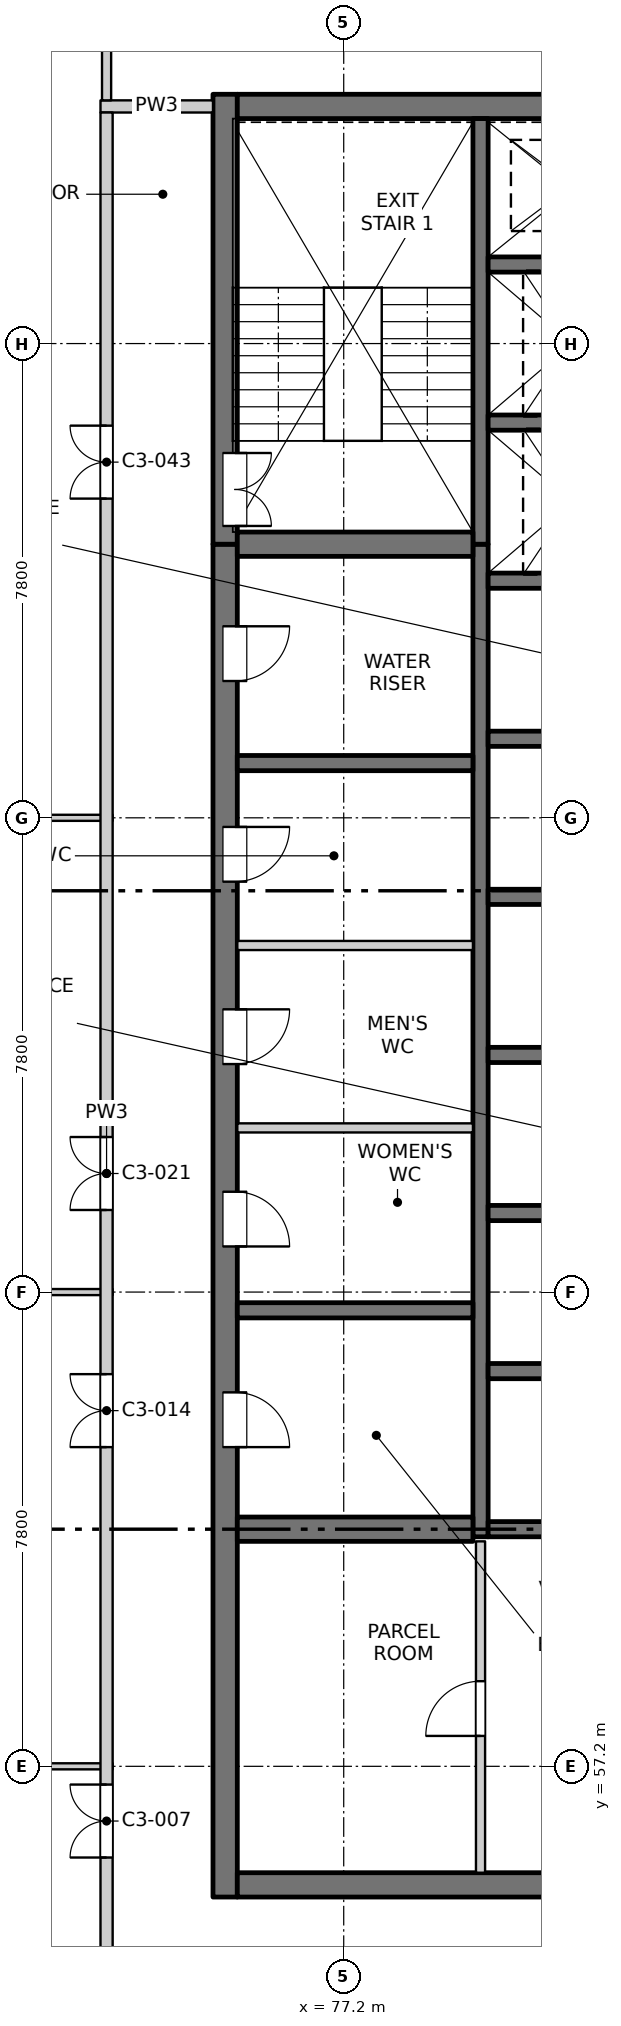
"""IFC4 building model, lengths in metres.
Left out: names, types, materials, properties, quantities, classifications, styles, units other than length and angle.
Written with IfcOpenShell. Run it as: python <this file> out.ifc"""

import sys

from ifc_helpers import new_model, si_unit, direction, frame, frame_2d, origin, place, context, subcontext, project, spatial, rectangle, extrude, element, fill, save


model = new_model("IFC4")
c1 = context("Model", 3, precision=1e-05, world=origin(), true_north=direction((0.0, 1.0)))
c2 = subcontext(c1, "Body", "Model", "MODEL_VIEW")
j1 = project(units=[si_unit("LENGTHUNIT", "METRE"), si_unit("PLANEANGLEUNIT", "RADIAN")], contexts=[c1])
p1 = place(None, origin())
s1 = spatial("IfcSite", under=j1, at=p1, CompositionType="ELEMENT")
p2 = place(p1, origin())
s2 = spatial("IfcBuilding", under=s1, at=p2, CompositionType="ELEMENT")
p3 = place(p2, frame((0.0, 0.0, 200.7)))
s3 = spatial("IfcBuildingStorey", under=s2, at=p3, CompositionType="ELEMENT", Elevation=200.7)
p4 = place(p3, frame((75.25, 55.05, -0.25), z_axis=(0.0, 0.0, 1.0), x_axis=(0.0, 1.0, 0.0)))
e1 = element("IfcWall", 1, at=p4, inside=s3, PredefinedType="SOLIDWALL", context=c2, shape_type="SweptSolid", body=[
    extrude(rectangle(XDim=22.25, YDim=0.4, at=frame_2d((11.125, 0.0))), origin(), (0.0, 0.0, 1.0), 3.4),
])
p5 = place(p4, frame((7.4, 0.0, 0.25)))
e2 = element("IfcOpeningElement", 2, at=p5, cuts=e1, PredefinedType="OPENING", context=c2, shape_type="SweptSolid", body=[
    extrude(rectangle(XDim=0.9, YDim=2.1, at=frame_2d((0.45, 1.05))), frame((0.0, 0.21, 0.0), z_axis=(0.0, -1.0, 0.0), x_axis=(1.0, 0.0, 0.0)), (0.0, 0.0, 1.0), 0.42),
])
p6 = place(p4, frame((10.7, 0.0, 0.25)))
e3 = element("IfcOpeningElement", 3, at=p6, cuts=e1, PredefinedType="OPENING", context=c2, shape_type="SweptSolid", body=[
    extrude(rectangle(XDim=0.9, YDim=2.1, at=frame_2d((0.45, 1.05))), frame((0.0, 0.21, 0.0), z_axis=(0.0, -1.0, 0.0), x_axis=(1.0, 0.0, 0.0)), (0.0, 0.0, 1.0), 0.42),
])
p7 = place(p4, frame((13.7, 0.0, 0.25)))
e4 = element("IfcOpeningElement", 4, at=p7, cuts=e1, PredefinedType="OPENING", context=c2, shape_type="SweptSolid", body=[
    extrude(rectangle(XDim=0.9, YDim=2.1, at=frame_2d((0.45, 1.05))), frame((0.0, 0.21, 0.0), z_axis=(0.0, -1.0, 0.0), x_axis=(1.0, 0.0, 0.0)), (0.0, 0.0, 1.0), 0.42),
])
p8 = place(p4, frame((16.7, 0.0, 0.25)))
e5 = element("IfcOpeningElement", 5, at=p8, cuts=e1, PredefinedType="OPENING", context=c2, shape_type="SweptSolid", body=[
    extrude(rectangle(XDim=0.9, YDim=2.1, at=frame_2d((0.45, 1.05))), frame((0.0, 0.21, 0.0), z_axis=(0.0, -1.0, 0.0), x_axis=(1.0, 0.0, 0.0)), (0.0, 0.0, 1.0), 0.42),
])
p9 = place(p4, frame((20.0, 0.0, 0.25)))
e6 = element("IfcOpeningElement", 6, at=p9, cuts=e1, PredefinedType="OPENING", context=c2, shape_type="SweptSolid", body=[
    extrude(rectangle(XDim=0.9, YDim=2.1, at=frame_2d((0.45, 1.05))), frame((0.0, 0.21, 0.0), z_axis=(0.0, -1.0, 0.0), x_axis=(1.0, 0.0, 0.0)), (0.0, 0.0, 1.0), 0.42),
])
p10 = place(p3, frame((75.25, 77.3, -0.25), z_axis=(0.0, 0.0, 1.0), x_axis=(0.0, 1.0, 0.0)))
e7 = element("IfcWall", 7, at=p10, inside=s3, PredefinedType="SOLIDWALL", context=c2, shape_type="SweptSolid", body=[
    extrude(rectangle(XDim=7.4, YDim=0.4, at=frame_2d((3.7, 0.0))), origin(), (0.0, 0.0, 1.0), 3.4),
])
p11 = place(p10, frame((0.3, 0.0, 0.25)))
e8 = element("IfcOpeningElement", 8, at=p11, cuts=e7, PredefinedType="OPENING", context=c2, shape_type="SweptSolid", body=[
    extrude(rectangle(XDim=1.2, YDim=2.1, at=frame_2d((0.6, 1.05))), frame((0.0, 0.21, 0.0), z_axis=(0.0, -1.0, 0.0), x_axis=(1.0, 0.0, 0.0)), (0.0, 0.0, 1.0), 0.42),
])
p12 = place(p3, frame((75.45, 55.25, -0.25), z_axis=(0.0, 0.0, 1.0), x_axis=(1.0, 0.0, 0.0)))
e9 = element("IfcWall", 9, at=p12, inside=s3, PredefinedType="SOLIDWALL", context=c2, shape_type="SweptSolid", body=[
    extrude(rectangle(XDim=19.1, YDim=0.4, at=frame_2d((9.55, 0.0))), origin(), (0.0, 0.0, 1.0), 3.4),
])
p13 = place(p12, frame((8.8, 0.0, 0.25)))
e10 = element("IfcOpeningElement", 10, at=p13, cuts=e9, PredefinedType="OPENING", context=c2, shape_type="SweptSolid", body=[
    extrude(rectangle(XDim=1.5, YDim=2.1, at=frame_2d((0.75, 1.05))), frame((0.0, 0.21, 0.0), z_axis=(0.0, -1.0, 0.0), x_axis=(1.0, 0.0, 0.0)), (0.0, 0.0, 1.0), 0.42),
])
p14 = place(p3, frame((75.45, 84.5, -0.25), z_axis=(0.0, 0.0, 1.0), x_axis=(1.0, 0.0, 0.0)))
e11 = element("IfcWall", 11, at=p14, inside=s3, PredefinedType="SOLIDWALL", context=c2, shape_type="SweptSolid", body=[
    extrude(rectangle(XDim=19.1, YDim=0.4, at=frame_2d((9.55, 0.0))), origin(), (0.0, 0.0, 1.0), 3.4),
])
p15 = place(p3, frame((79.45, 60.975, -0.25), z_axis=(0.0, 0.0, 1.0), x_axis=(0.0, 1.0, 0.0)))
e12 = element("IfcWall", 12, at=p15, inside=s3, PredefinedType="SOLIDWALL", context=c2, shape_type="SweptSolid", body=[
    extrude(rectangle(XDim=16.325, YDim=0.25, at=frame_2d((8.163, 0.0))), origin(), (0.0, 0.0, 1.0), 3.4),
])
p16 = place(p3, frame((79.45, 77.3, -0.25), z_axis=(0.0, 0.0, 1.0), x_axis=(0.0, 1.0, 0.0)))
e13 = element("IfcWall", 13, at=p16, inside=s3, PredefinedType="SOLIDWALL", context=c2, shape_type="SweptSolid", body=[
    extrude(rectangle(XDim=7.0, YDim=0.25, at=frame_2d((3.5, 0.0))), origin(), (0.0, 0.0, 1.0), 3.4),
])
for number, where, z_axis, x_axis in (
    (14, (79.575, 61.1, -0.25), (0.0, 0.0, 1.0), (1.0, 0.0, 0.0)),
    (15, (79.575, 63.7, -0.25), (0.0, 0.0, 1.0), (1.0, 0.0, 0.0)),
    (16, (79.575, 66.3, -0.25), (0.0, 0.0, 1.0), (1.0, 0.0, 0.0)),
    (17, (79.575, 68.9, -0.25), (0.0, 0.0, 1.0), (1.0, 0.0, 0.0)),
    (18, (79.575, 71.5, -0.25), (0.0, 0.0, 1.0), (1.0, 0.0, 0.0)),
    (19, (79.575, 74.1, -0.25), (0.0, 0.0, 1.0), (1.0, 0.0, 0.0)),
    (20, (79.575, 76.7, -0.25), (0.0, 0.0, 1.0), (1.0, 0.0, 0.0)),
    (21, (79.575, 79.3, -0.25), (0.0, 0.0, 1.0), (1.0, 0.0, 0.0)),
    (22, (79.575, 81.9, -0.25), (0.0, 0.0, 1.0), (1.0, 0.0, 0.0)),
):
    element("IfcWall", number, at=place(p3, frame(where, z_axis=z_axis, x_axis=x_axis)), inside=s3, PredefinedType="SOLIDWALL", context=c2, shape_type="SweptSolid", body=[
        extrude(rectangle(XDim=3.0, YDim=0.25, at=frame_2d((1.5, 0.0))), origin(), (0.0, 0.0, 1.0), 3.4),
    ])
p17 = place(p3, frame((75.45, 61.1, -0.25), z_axis=(0.0, 0.0, 1.0), x_axis=(1.0, 0.0, 0.0)))
e23 = element("IfcWall", 23, at=p17, inside=s3, PredefinedType="SOLIDWALL", context=c2, shape_type="SweptSolid", body=[
    extrude(rectangle(XDim=3.875, YDim=0.4, at=frame_2d((1.938, 0.0))), origin(), (0.0, 0.0, 1.0), 3.4),
])
for number, where, z_axis, x_axis in (
    (24, (75.45, 64.7, -0.25), (0.0, 0.0, 1.0), (1.0, 0.0, 0.0)),
    (25, (75.45, 73.7, -0.25), (0.0, 0.0, 1.0), (1.0, 0.0, 0.0)),
):
    element("IfcWall", number, at=place(p3, frame(where, z_axis=z_axis, x_axis=x_axis)), inside=s3, PredefinedType="SOLIDWALL", context=c2, shape_type="SweptSolid", body=[
        extrude(rectangle(XDim=3.875, YDim=0.25, at=frame_2d((1.938, 0.0))), origin(), (0.0, 0.0, 1.0), 3.4),
    ])
p18 = place(p3, frame((75.45, 77.3, -0.25), z_axis=(0.0, 0.0, 1.0), x_axis=(1.0, 0.0, 0.0)))
e26 = element("IfcWall", 26, at=p18, inside=s3, PredefinedType="SOLIDWALL", context=c2, shape_type="SweptSolid", body=[
    extrude(rectangle(XDim=3.875, YDim=0.4, at=frame_2d((1.938, 0.0))), origin(), (0.0, 0.0, 1.0), 3.4),
])
for number, where, z_axis, x_axis in (
    (27, (61.735, 57.2, 0.0), (0.0, 0.0, 1.0), (1.0, 0.0, 0.0)),
    (28, (61.735, 65.0, 0.0), (0.0, 0.0, 1.0), (1.0, 0.0, 0.0)),
):
    element("IfcWall", number, at=place(p3, frame(where, z_axis=z_axis, x_axis=x_axis)), inside=s3, PredefinedType="PARTITIONING", context=c2, shape_type="SweptSolid", body=[
        extrude(rectangle(XDim=11.665, YDim=0.1, at=frame_2d((5.833, 0.0))), origin(), (0.0, 0.0, 1.0), 3.15),
    ])
for number, where, z_axis, x_axis in (
    (29, (75.45, 67.7, 0.0), (0.0, 0.0, 1.0), (1.0, 0.0, 0.0)),
    (30, (75.45, 70.7, 0.0), (0.0, 0.0, 1.0), (1.0, 0.0, 0.0)),
):
    element("IfcWall", number, at=place(p3, frame(where, z_axis=z_axis, x_axis=x_axis)), inside=s3, PredefinedType="PARTITIONING", context=c2, shape_type="SweptSolid", body=[
        extrude(rectangle(XDim=3.875, YDim=0.15, at=frame_2d((1.938, 0.0))), origin(), (0.0, 0.0, 1.0), 3.15),
    ])
p19 = place(p3, frame((61.735, 72.8, 0.0), z_axis=(0.0, 0.0, 1.0), x_axis=(1.0, 0.0, 0.0)))
e31 = element("IfcWall", 31, at=p19, inside=s3, PredefinedType="PARTITIONING", context=c2, shape_type="SweptSolid", body=[
    extrude(rectangle(XDim=11.665, YDim=0.1, at=frame_2d((5.833, 0.0))), origin(), (0.0, 0.0, 1.0), 3.15),
])
p20 = place(p3, frame((73.2, 84.5, 0.0), z_axis=(0.0, 0.0, 1.0), x_axis=(1.0, 0.0, 0.0)))
e32 = element("IfcWall", 32, at=p20, inside=s3, PredefinedType="PARTITIONING", context=c2, shape_type="SweptSolid", body=[
    extrude(rectangle(XDim=1.85, YDim=0.2, at=frame_2d((0.925, 0.0))), origin(), (0.0, 0.0, 1.0), 3.15),
])
p21 = place(p3, frame((73.3, 49.5, 0.0), z_axis=(0.0, 0.0, 1.0), x_axis=(0.0, 1.0, 0.0)))
e33 = element("IfcWall", 33, at=p21, inside=s3, PredefinedType="PARTITIONING", context=c2, shape_type="SweptSolid", body=[
    extrude(rectangle(XDim=34.9, YDim=0.2, at=frame_2d((17.45, 0.0))), origin(), (0.0, 0.0, 1.0), 3.15),
])
p22 = place(p21, frame((6.2, 0.0, 0.0)))
e34 = element("IfcOpeningElement", 34, at=p22, cuts=e33, PredefinedType="OPENING", context=c2, shape_type="SweptSolid", body=[
    extrude(rectangle(XDim=1.2, YDim=2.1, at=frame_2d((0.6, 1.05))), frame((0.0, 0.11, 0.0), z_axis=(0.0, -1.0, 0.0), x_axis=(1.0, 0.0, 0.0)), (0.0, 0.0, 1.0), 0.22),
])
p23 = place(p21, frame((12.95, 0.0, 0.0)))
e35 = element("IfcOpeningElement", 35, at=p23, cuts=e33, PredefinedType="OPENING", context=c2, shape_type="SweptSolid", body=[
    extrude(rectangle(XDim=1.2, YDim=2.1, at=frame_2d((0.6, 1.05))), frame((0.0, 0.11, 0.0), z_axis=(0.0, -1.0, 0.0), x_axis=(1.0, 0.0, 0.0)), (0.0, 0.0, 1.0), 0.22),
])
p24 = place(p21, frame((16.85, 0.0, 0.0)))
e36 = element("IfcOpeningElement", 36, at=p24, cuts=e33, PredefinedType="OPENING", context=c2, shape_type="SweptSolid", body=[
    extrude(rectangle(XDim=1.2, YDim=2.1, at=frame_2d((0.6, 1.05))), frame((0.0, 0.11, 0.0), z_axis=(0.0, -1.0, 0.0), x_axis=(1.0, 0.0, 0.0)), (0.0, 0.0, 1.0), 0.22),
])
p25 = place(p21, frame((28.55, 0.0, 0.0)))
e37 = element("IfcOpeningElement", 37, at=p25, cuts=e33, PredefinedType="OPENING", context=c2, shape_type="SweptSolid", body=[
    extrude(rectangle(XDim=1.2, YDim=2.1, at=frame_2d((0.6, 1.05))), frame((0.0, 0.11, 0.0), z_axis=(0.0, -1.0, 0.0), x_axis=(1.0, 0.0, 0.0)), (0.0, 0.0, 1.0), 0.22),
])
p26 = place(p3, frame((73.3, 84.6, 0.0), z_axis=(0.0, 0.0, 1.0), x_axis=(0.0, 1.0, 0.0)))
e38 = element("IfcWall", 38, at=p26, inside=s3, PredefinedType="PARTITIONING", context=c2, shape_type="SweptSolid", body=[
    extrude(rectangle(XDim=3.665, YDim=0.15, at=frame_2d((1.833, 0.0))), origin(), (0.0, 0.0, 1.0), 3.15),
])
p27 = place(p26, frame((1.25, 0.0, 0.0)))
e39 = element("IfcOpeningElement", 39, at=p27, cuts=e38, PredefinedType="OPENING", context=c2, shape_type="SweptSolid", body=[
    extrude(rectangle(XDim=1.2, YDim=2.1, at=frame_2d((0.6, 1.05))), frame((0.0, 0.085, 0.0), z_axis=(0.0, -1.0, 0.0), x_axis=(1.0, 0.0, 0.0)), (0.0, 0.0, 1.0), 0.17),
])
p28 = place(p3, frame((79.45, 55.45, 0.0), z_axis=(0.0, 0.0, 1.0), x_axis=(0.0, 1.0, 0.0)))
e40 = element("IfcWall", 40, at=p28, inside=s3, PredefinedType="PARTITIONING", context=c2, shape_type="SweptSolid", body=[
    extrude(rectangle(XDim=5.45, YDim=0.15, at=frame_2d((2.725, 0.0))), origin(), (0.0, 0.0, 1.0), 3.15),
])
p29 = place(p28, frame((2.25, 0.0, 0.0)))
e41 = element("IfcOpeningElement", 41, at=p29, cuts=e40, PredefinedType="OPENING", context=c2, shape_type="SweptSolid", body=[
    extrude(rectangle(XDim=0.9, YDim=2.1, at=frame_2d((0.45, 1.05))), frame((0.0, 0.085, 0.0), z_axis=(0.0, -1.0, 0.0), x_axis=(1.0, 0.0, 0.0)), (0.0, 0.0, 1.0), 0.17),
])
p30 = place(p22, origin())
e42 = element("IfcDoor", 42, at=p30, inside=s3, OperationType="DOUBLE_DOOR_SINGLE_SWING", PredefinedType="DOOR", context=c2, shape_type="SweptSolid", body=[
    extrude(rectangle(XDim=1.2, YDim=2.1, at=frame_2d((0.6, 1.05))), frame((0.0, 0.025, 0.0), z_axis=(0.0, -1.0, 0.0), x_axis=(1.0, 0.0, 0.0)), (0.0, 0.0, 1.0), 0.05),
])
fill(e34, e42)
p31 = place(p29, origin())
e43 = element("IfcDoor", 43, at=p31, inside=s3, OperationType="SINGLE_SWING_LEFT", PredefinedType="DOOR", context=c2, shape_type="SweptSolid", body=[
    extrude(rectangle(XDim=0.9, YDim=2.1, at=frame_2d((0.45, 1.05))), frame((0.0, 0.025, 0.0), z_axis=(0.0, -1.0, 0.0), x_axis=(1.0, 0.0, 0.0)), (0.0, 0.0, 1.0), 0.05),
])
fill(e41, e43)
p32 = place(p5, origin())
e44 = element("IfcDoor", 44, at=p32, inside=s3, OperationType="SINGLE_SWING_RIGHT", PredefinedType="DOOR", context=c2, shape_type="SweptSolid", body=[
    extrude(rectangle(XDim=0.9, YDim=2.1, at=frame_2d((0.45, 1.05))), frame((0.0, -0.135, 0.0), z_axis=(0.0, -1.0, 0.0), x_axis=(1.0, 0.0, 0.0)), (0.0, 0.0, 1.0), 0.05),
])
fill(e2, e44)
p33 = place(p23, origin())
e45 = element("IfcDoor", 45, at=p33, inside=s3, OperationType="DOUBLE_DOOR_SINGLE_SWING", PredefinedType="DOOR", context=c2, shape_type="SweptSolid", body=[
    extrude(rectangle(XDim=1.2, YDim=2.1, at=frame_2d((0.6, 1.05))), frame((0.0, 0.025, 0.0), z_axis=(0.0, -1.0, 0.0), x_axis=(1.0, 0.0, 0.0)), (0.0, 0.0, 1.0), 0.05),
])
fill(e35, e45)
p34 = place(p6, origin())
e46 = element("IfcDoor", 46, at=p34, inside=s3, OperationType="SINGLE_SWING_RIGHT", PredefinedType="DOOR", context=c2, shape_type="SweptSolid", body=[
    extrude(rectangle(XDim=0.9, YDim=2.1, at=frame_2d((0.45, 1.05))), frame((0.0, -0.135, 0.0), z_axis=(0.0, -1.0, 0.0), x_axis=(1.0, 0.0, 0.0)), (0.0, 0.0, 1.0), 0.05),
])
fill(e3, e46)
p35 = place(p24, origin())
e47 = element("IfcDoor", 47, at=p35, inside=s3, OperationType="DOUBLE_DOOR_SINGLE_SWING", PredefinedType="DOOR", context=c2, shape_type="SweptSolid", body=[
    extrude(rectangle(XDim=1.2, YDim=2.1, at=frame_2d((0.6, 1.05))), frame((0.0, 0.025, 0.0), z_axis=(0.0, -1.0, 0.0), x_axis=(1.0, 0.0, 0.0)), (0.0, 0.0, 1.0), 0.05),
])
fill(e36, e47)
p36 = place(p7, origin())
e48 = element("IfcDoor", 48, at=p36, inside=s3, OperationType="SINGLE_SWING_LEFT", PredefinedType="DOOR", context=c2, shape_type="SweptSolid", body=[
    extrude(rectangle(XDim=0.9, YDim=2.1, at=frame_2d((0.45, 1.05))), frame((0.0, -0.135, 0.0), z_axis=(0.0, -1.0, 0.0), x_axis=(1.0, 0.0, 0.0)), (0.0, 0.0, 1.0), 0.05),
])
fill(e4, e48)
p37 = place(p8, origin())
e49 = element("IfcDoor", 49, at=p37, inside=s3, OperationType="SINGLE_SWING_LEFT", PredefinedType="DOOR", context=c2, shape_type="SweptSolid", body=[
    extrude(rectangle(XDim=0.9, YDim=2.1, at=frame_2d((0.45, 1.05))), frame((0.0, -0.135, 0.0), z_axis=(0.0, -1.0, 0.0), x_axis=(1.0, 0.0, 0.0)), (0.0, 0.0, 1.0), 0.05),
])
fill(e5, e49)
p38 = place(p9, origin())
e50 = element("IfcDoor", 50, at=p38, inside=s3, OperationType="SINGLE_SWING_LEFT", PredefinedType="DOOR", context=c2, shape_type="SweptSolid", body=[
    extrude(rectangle(XDim=0.9, YDim=2.1, at=frame_2d((0.45, 1.05))), frame((0.0, -0.135, 0.0), z_axis=(0.0, -1.0, 0.0), x_axis=(1.0, 0.0, 0.0)), (0.0, 0.0, 1.0), 0.05),
])
fill(e6, e50)
p39 = place(p11, origin())
e51 = element("IfcDoor", 51, at=p39, inside=s3, OperationType="DOUBLE_DOOR_SINGLE_SWING", PredefinedType="DOOR", context=c2, shape_type="SweptSolid", body=[
    extrude(rectangle(XDim=1.2, YDim=2.1, at=frame_2d((0.6, 1.05))), frame((0.0, -0.135, 0.0), z_axis=(0.0, -1.0, 0.0), x_axis=(1.0, 0.0, 0.0)), (0.0, 0.0, 1.0), 0.05),
])
fill(e8, e51)
p40 = place(p25, origin())
e52 = element("IfcDoor", 52, at=p40, inside=s3, OperationType="DOUBLE_DOOR_SINGLE_SWING", PredefinedType="DOOR", context=c2, shape_type="SweptSolid", body=[
    extrude(rectangle(XDim=1.2, YDim=2.1, at=frame_2d((0.6, 1.05))), frame((0.0, 0.025, 0.0), z_axis=(0.0, -1.0, 0.0), x_axis=(1.0, 0.0, 0.0)), (0.0, 0.0, 1.0), 0.05),
])
fill(e37, e52)
save(model, sys.argv[1])
